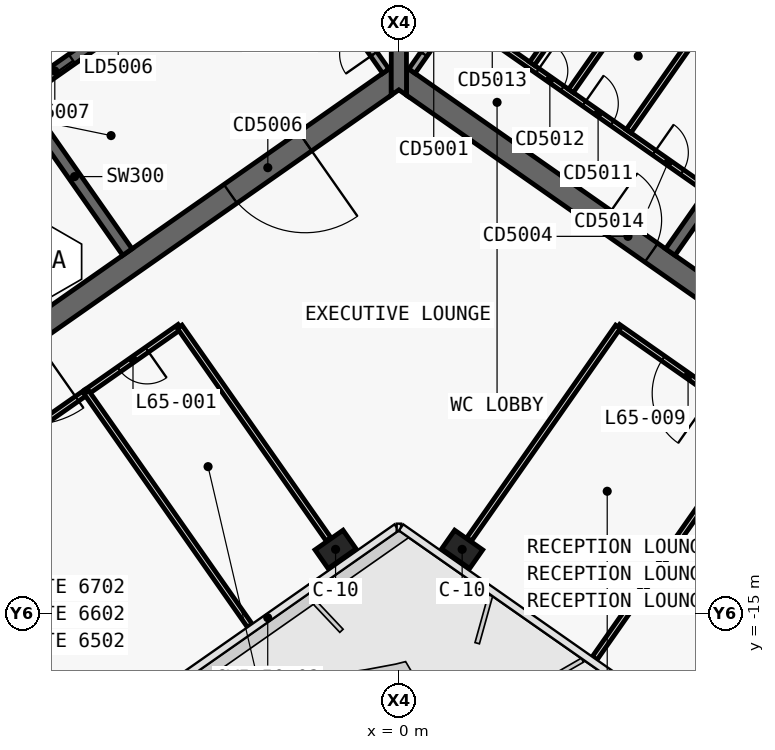
"""IFC4 building model, lengths in metres.
Left out: names, types, materials, properties, quantities, classifications, styles, units other than length and angle.
Written with IfcOpenShell. Run it as: python <this file> out.ifc"""

import sys

from ifc_helpers import new_model, si_unit, direction, frame, frame_2d, origin, origin_2d, place, context, subcontext, project, spatial, polyline, rectangle, outline, extrude, element, fill, save


model = new_model("IFC4")
c1 = context("Model", 3, precision=1e-05, world=origin(), true_north=direction((0.0, 1.0)))
c2 = subcontext(c1, "Body", "Model", "MODEL_VIEW")
j1 = project(units=[si_unit("LENGTHUNIT", "METRE"), si_unit("PLANEANGLEUNIT", "RADIAN")], contexts=[c1])
p1 = place(None, origin())
s1 = spatial("IfcSite", under=j1, at=p1, CompositionType="ELEMENT")
p2 = place(p1, origin())
s2 = spatial("IfcBuilding", under=s1, at=p2, CompositionType="ELEMENT")
p3 = place(p2, frame((0.0, 0.0, 276.1)))
s3 = spatial("IfcBuildingStorey", under=s2, at=p3, CompositionType="ELEMENT", Elevation=276.1)
p4 = place(p3, frame((-0.028, 12.066, 0.0), z_axis=(0.0, 0.0, 1.0), x_axis=(-0.819151382952, -0.573577380837, 0.0)))
e1 = element("IfcWall", 1, at=p4, inside=s3, PredefinedType="SHEAR", context=c2, shape_type="SweptSolid", body=[
    extrude(outline(polyline([(33.898, 0.3), (0.42, 0.3), (0.0, -0.3), (33.898, -0.3), (33.898, 0.3)])), origin(), (0.0, 0.0, 1.0), 3.9),
])
p5 = place(p3, frame((-0.028, -0.874, 0.0), z_axis=(0.0, 0.0, 1.0), x_axis=(-0.819150035022, -0.573579305871, 0.0)))
e2 = element("IfcWall", 2, at=p5, inside=s3, PredefinedType="SHEAR", context=c2, shape_type="SweptSolid", body=[
    extrude(outline(polyline([(26.476, 0.3), (0.42, 0.3), (0.0, -0.3), (26.476, -0.3), (26.476, 0.3)])), origin(), (0.0, 0.0, 1.0), 3.9),
])
p6 = place(p5, frame((2.976, 0.0, 0.0)))
e3 = element("IfcOpeningElement", 3, at=p6, cuts=e2, PredefinedType="OPENING", context=c2, shape_type="SweptSolid", body=[
    extrude(rectangle(XDim=2.4, YDim=2.1, at=frame_2d((1.2, 1.05))), frame((0.0, 0.31, 0.0), z_axis=(0.0, -1.0, 0.0), x_axis=(1.0, 0.0, 0.0)), (0.0, 0.0, 1.0), 0.62),
])
p7 = place(p5, frame((11.776, 0.0, 0.0)))
e4 = element("IfcOpeningElement", 4, at=p7, cuts=e2, PredefinedType="OPENING", context=c2, shape_type="SweptSolid", body=[
    extrude(rectangle(XDim=2.4, YDim=2.1, at=frame_2d((1.2, 1.05))), frame((0.0, 0.31, 0.0), z_axis=(0.0, -1.0, 0.0), x_axis=(1.0, 0.0, 0.0)), (0.0, 0.0, 1.0), 0.62),
])
p8 = place(p3, frame((-7.143, -5.49, 0.0), z_axis=(0.0, 0.0, 1.0), x_axis=(-0.573617744349, 0.819123118565, 0.0)))
e5 = element("IfcWall", 5, at=p8, inside=s3, PredefinedType="SHEAR", context=c2, shape_type="SweptSolid", body=[
    extrude(outline(polyline([(4.85, 0.15), (0.0, 0.15), (0.0, -0.15), (4.85, -0.15), (4.85, 0.15)])), origin(), (0.0, 0.0, 1.0), 3.9),
])
p9 = place(p3, frame((-2.638, 3.768, 0.0), z_axis=(0.0, 0.0, 1.0), x_axis=(-0.819155014212, -0.573572194837, 0.0)))
e6 = element("IfcWall", 6, at=p9, inside=s3, PredefinedType="SHEAR", context=c2, shape_type="SweptSolid", body=[
    extrude(outline(polyline([(26.4, 0.15), (0.0, 0.15), (0.0, -0.15), (26.4, -0.15), (26.4, 0.15)])), origin(), (0.0, 0.0, 1.0), 3.9),
])
p10 = place(p9, frame((1.169, 0.0, 0.0)))
e7 = element("IfcOpeningElement", 7, at=p10, cuts=e6, PredefinedType="OPENING", context=c2, shape_type="SweptSolid", body=[
    extrude(rectangle(XDim=1.1, YDim=2.1, at=frame_2d((0.55, 1.05))), frame((0.0, 0.16, 0.0), z_axis=(0.0, -1.0, 0.0), x_axis=(1.0, 0.0, 0.0)), (0.0, 0.0, 1.0), 0.32),
])
p11 = place(p9, frame((3.206, 0.0, 0.0)))
e8 = element("IfcOpeningElement", 8, at=p11, cuts=e6, PredefinedType="OPENING", context=c2, shape_type="SweptSolid", body=[
    extrude(rectangle(XDim=1.1, YDim=2.1, at=frame_2d((0.55, 1.05))), frame((0.0, 0.16, 0.0), z_axis=(0.0, -1.0, 0.0), x_axis=(1.0, 0.0, 0.0)), (0.0, 0.0, 1.0), 0.32),
])
p12 = place(p9, frame((5.244, 0.0, 0.0)))
e9 = element("IfcOpeningElement", 9, at=p12, cuts=e6, PredefinedType="OPENING", context=c2, shape_type="SweptSolid", body=[
    extrude(rectangle(XDim=1.1, YDim=2.1, at=frame_2d((0.55, 1.05))), frame((0.0, 0.16, 0.0), z_axis=(0.0, -1.0, 0.0), x_axis=(1.0, 0.0, 0.0)), (0.0, 0.0, 1.0), 0.32),
])
p13 = place(p9, frame((7.281, 0.0, 0.0)))
e10 = element("IfcOpeningElement", 10, at=p13, cuts=e6, PredefinedType="OPENING", context=c2, shape_type="SweptSolid", body=[
    extrude(rectangle(XDim=1.1, YDim=2.1, at=frame_2d((0.55, 1.05))), frame((0.0, 0.16, 0.0), z_axis=(0.0, -1.0, 0.0), x_axis=(1.0, 0.0, 0.0)), (0.0, 0.0, 1.0), 0.32),
])
p14 = place(p9, frame((9.688, 0.0, 0.0)))
e11 = element("IfcOpeningElement", 11, at=p14, cuts=e6, PredefinedType="OPENING", context=c2, shape_type="SweptSolid", body=[
    extrude(rectangle(XDim=1.1, YDim=2.1, at=frame_2d((0.55, 1.05))), frame((0.0, 0.16, 0.0), z_axis=(0.0, -1.0, 0.0), x_axis=(1.0, 0.0, 0.0)), (0.0, 0.0, 1.0), 0.32),
])
p15 = place(p9, frame((11.863, 0.0, 0.0)))
e12 = element("IfcOpeningElement", 12, at=p15, cuts=e6, PredefinedType="OPENING", context=c2, shape_type="SweptSolid", body=[
    extrude(rectangle(XDim=1.1, YDim=2.1, at=frame_2d((0.55, 1.05))), frame((0.0, 0.16, 0.0), z_axis=(0.0, -1.0, 0.0), x_axis=(1.0, 0.0, 0.0)), (0.0, 0.0, 1.0), 0.32),
])
p16 = place(p9, frame((14.552, 0.0, 0.0)))
e13 = element("IfcOpeningElement", 13, at=p16, cuts=e6, PredefinedType="OPENING", context=c2, shape_type="SweptSolid", body=[
    extrude(rectangle(XDim=1.0, YDim=2.1, at=frame_2d((0.5, 1.05))), frame((0.0, 0.16, 0.0), z_axis=(0.0, -1.0, 0.0), x_axis=(1.0, 0.0, 0.0)), (0.0, 0.0, 1.0), 0.32),
])
p17 = place(p9, frame((16.627, 0.0, 0.0)))
e14 = element("IfcOpeningElement", 14, at=p17, cuts=e6, PredefinedType="OPENING", context=c2, shape_type="SweptSolid", body=[
    extrude(rectangle(XDim=1.0, YDim=2.1, at=frame_2d((0.5, 1.05))), frame((0.0, 0.16, 0.0), z_axis=(0.0, -1.0, 0.0), x_axis=(1.0, 0.0, 0.0)), (0.0, 0.0, 1.0), 0.32),
])
p18 = place(p3, frame((0.028, 12.066, 0.0), z_axis=(0.0, 0.0, 1.0), x_axis=(0.819151382952, -0.573577380837, 0.0)))
e15 = element("IfcWall", 15, at=p18, inside=s3, PredefinedType="SHEAR", context=c2, shape_type="SweptSolid", body=[
    extrude(outline(polyline([(33.898, 0.3), (0.0, 0.3), (0.42, -0.3), (33.898, -0.3), (33.898, 0.3)])), origin(), (0.0, 0.0, 1.0), 3.9),
])
p19 = place(p3, frame((0.028, -0.874, 0.0), z_axis=(0.0, 0.0, 1.0), x_axis=(0.819150035022, -0.573579305871, 0.0)))
e16 = element("IfcWall", 16, at=p19, inside=s3, PredefinedType="SHEAR", context=c2, shape_type="SweptSolid", body=[
    extrude(outline(polyline([(26.476, 0.3), (0.0, 0.3), (0.42, -0.3), (26.476, -0.3), (26.476, 0.3)])), origin(), (0.0, 0.0, 1.0), 3.9),
])
p20 = place(p19, frame((6.576, 0.0, 0.0)))
e17 = element("IfcOpeningElement", 17, at=p20, cuts=e16, PredefinedType="OPENING", context=c2, shape_type="SweptSolid", body=[
    extrude(rectangle(XDim=1.5, YDim=2.1, at=frame_2d((0.75, 1.05))), frame((0.0, 0.31, 0.0), z_axis=(0.0, -1.0, 0.0), x_axis=(1.0, 0.0, 0.0)), (0.0, 0.0, 1.0), 0.62),
])
p21 = place(p19, frame((12.226, 0.0, 0.0)))
e18 = element("IfcOpeningElement", 18, at=p21, cuts=e16, PredefinedType="OPENING", context=c2, shape_type="SweptSolid", body=[
    extrude(rectangle(XDim=1.5, YDim=2.1, at=frame_2d((0.75, 1.05))), frame((0.0, 0.31, 0.0), z_axis=(0.0, -1.0, 0.0), x_axis=(1.0, 0.0, 0.0)), (0.0, 0.0, 1.0), 0.62),
])
p22 = place(p3, frame((7.143, -5.49, 0.0), z_axis=(0.0, 0.0, 1.0), x_axis=(0.573617744349, 0.819123118565, 0.0)))
e19 = element("IfcWall", 19, at=p22, inside=s3, PredefinedType="SHEAR", context=c2, shape_type="SweptSolid", body=[
    extrude(outline(polyline([(0.0, 0.15), (0.0, -0.15), (4.85, -0.15), (4.85, 0.15), (0.0, 0.15)])), origin(), (0.0, 0.0, 1.0), 3.9),
])
p23 = place(p3, frame((2.638, 3.768, 0.0), z_axis=(0.0, 0.0, 1.0), x_axis=(0.819155014212, -0.573572194837, 0.0)))
e20 = element("IfcWall", 20, at=p23, inside=s3, PredefinedType="SHEAR", context=c2, shape_type="SweptSolid", body=[
    extrude(outline(polyline([(0.0, 0.15), (0.0, -0.15), (26.4, -0.15), (26.4, 0.15), (0.0, 0.15)])), origin(), (0.0, 0.0, 1.0), 3.9),
])
p24 = place(p23, frame((9.637, 0.0, 0.0)))
e21 = element("IfcOpeningElement", 21, at=p24, cuts=e20, PredefinedType="OPENING", context=c2, shape_type="SweptSolid", body=[
    extrude(rectangle(XDim=1.2, YDim=2.1, at=frame_2d((0.6, 1.05))), frame((0.0, 0.16, 0.0), z_axis=(0.0, -1.0, 0.0), x_axis=(1.0, 0.0, 0.0)), (0.0, 0.0, 1.0), 0.32),
])
p25 = place(p23, frame((11.812, 0.0, 0.0)))
e22 = element("IfcOpeningElement", 22, at=p25, cuts=e20, PredefinedType="OPENING", context=c2, shape_type="SweptSolid", body=[
    extrude(rectangle(XDim=1.2, YDim=2.1, at=frame_2d((0.6, 1.05))), frame((0.0, 0.16, 0.0), z_axis=(0.0, -1.0, 0.0), x_axis=(1.0, 0.0, 0.0)), (0.0, 0.0, 1.0), 0.32),
])
p26 = place(p23, frame((13.988, 0.0, 0.0)))
e23 = element("IfcOpeningElement", 23, at=p26, cuts=e20, PredefinedType="OPENING", context=c2, shape_type="SweptSolid", body=[
    extrude(rectangle(XDim=1.2, YDim=2.1, at=frame_2d((0.6, 1.05))), frame((0.0, 0.16, 0.0), z_axis=(0.0, -1.0, 0.0), x_axis=(1.0, 0.0, 0.0)), (0.0, 0.0, 1.0), 0.32),
])
p27 = place(p23, frame((16.262, 0.0, 0.0)))
e24 = element("IfcOpeningElement", 24, at=p27, cuts=e20, PredefinedType="OPENING", context=c2, shape_type="SweptSolid", body=[
    extrude(rectangle(XDim=1.0, YDim=2.1, at=frame_2d((0.5, 1.05))), frame((0.0, 0.16, 0.0), z_axis=(0.0, -1.0, 0.0), x_axis=(1.0, 0.0, 0.0)), (0.0, 0.0, 1.0), 0.32),
])
p28 = place(p3, frame((0.0, -1.361, 0.0), z_axis=(0.0, 0.0, 1.0), x_axis=(0.0, 1.0, 0.0)))
e25 = element("IfcWall", 25, at=p28, inside=s3, PredefinedType="SHEAR", context=c2, shape_type="SweptSolid", body=[
    extrude(outline(polyline([(0.14, 0.2), (0.0, 0.2), (0.14, 0.0), (0.0, -0.2), (0.14, -0.2), (1.012, -0.2), (12.94, -0.2), (13.813, -0.2), (13.893, -0.2), (13.933, -0.172), (13.813, 0.0), (13.933, 0.172), (13.893, 0.2), (13.813, 0.2), (12.94, 0.2), (1.012, 0.2), (0.14, 0.2)])), origin(), (0.0, 0.0, 1.0), 3.9),
])
for number, where, z_axis, x_axis in (
    (26, (-1.665, -13.313, 0.0), (0.0, 0.0, 1.0), (-0.819, -0.574, 0.0)),
    (27, (1.665, -13.313, 0.0), (0.0, 0.0, 1.0), (0.819, -0.574, 0.0)),
):
    element("IfcColumn", number, at=place(p3, frame(where, z_axis=z_axis, x_axis=x_axis)), inside=s3, PredefinedType="COLUMN", context=c2, shape_type="SweptSolid", body=[
        extrude(rectangle(XDim=0.9, YDim=0.6, at=origin_2d()), origin(), (0.0, 0.0, 1.0), 3.9),
    ])
p29 = place(p3, frame((1.516, 0.77, 0.0), z_axis=(0.0, 0.0, 1.0), x_axis=(0.819146424436, -0.573584462249, 0.0)))
e28 = element("IfcWall", 28, at=p29, inside=s3, PredefinedType="PARTITIONING", context=c2, shape_type="SweptSolid", body=[
    extrude(rectangle(XDim=8.05, YDim=0.15, at=frame_2d((4.025, 0.0))), origin(), (0.0, 0.0, 1.0), 3.62),
])
p30 = place(p29, frame((0.7, 0.0, 0.0)))
e29 = element("IfcOpeningElement", 29, at=p30, cuts=e28, PredefinedType="OPENING", context=c2, shape_type="SweptSolid", body=[
    extrude(rectangle(XDim=0.9, YDim=2.1, at=frame_2d((0.45, 1.05))), frame((0.0, 0.085, 0.0), z_axis=(0.0, -1.0, 0.0), x_axis=(1.0, 0.0, 0.0)), (0.0, 0.0, 1.0), 0.17),
])
p31 = place(p29, frame((2.6, 0.0, 0.0)))
e30 = element("IfcOpeningElement", 30, at=p31, cuts=e28, PredefinedType="OPENING", context=c2, shape_type="SweptSolid", body=[
    extrude(rectangle(XDim=0.8, YDim=2.1, at=frame_2d((0.4, 1.05))), frame((0.0, 0.085, 0.0), z_axis=(0.0, -1.0, 0.0), x_axis=(1.0, 0.0, 0.0)), (0.0, 0.0, 1.0), 0.17),
])
p32 = place(p29, frame((4.1, 0.0, 0.0)))
e31 = element("IfcOpeningElement", 31, at=p32, cuts=e28, PredefinedType="OPENING", context=c2, shape_type="SweptSolid", body=[
    extrude(rectangle(XDim=0.9, YDim=2.1, at=frame_2d((0.45, 1.05))), frame((0.0, 0.085, 0.0), z_axis=(0.0, -1.0, 0.0), x_axis=(1.0, 0.0, 0.0)), (0.0, 0.0, 1.0), 0.17),
])
p33 = place(p29, frame((6.35, 0.0, 0.0)))
e32 = element("IfcOpeningElement", 32, at=p33, cuts=e28, PredefinedType="OPENING", context=c2, shape_type="SweptSolid", body=[
    extrude(rectangle(XDim=0.9, YDim=2.1, at=frame_2d((0.45, 1.05))), frame((0.0, 0.085, 0.0), z_axis=(0.0, -1.0, 0.0), x_axis=(1.0, 0.0, 0.0)), (0.0, 0.0, 1.0), 0.17),
])
p34 = place(p3, frame((3.504, -0.531, 0.0), z_axis=(0.0, 0.0, 1.0), x_axis=(0.573582013179, 0.819148139324, 0.0)))
e33 = element("IfcWall", 33, at=p34, inside=s3, PredefinedType="PARTITIONING", context=c2, shape_type="SweptSolid", body=[
    extrude(rectangle(XDim=2.875, YDim=0.15, at=frame_2d((1.438, 0.0))), origin(), (0.0, 0.0, 1.0), 3.62),
])
p35 = place(p3, frame((4.528, -1.248, 0.0), z_axis=(0.0, 0.0, 1.0), x_axis=(0.573621911162, 0.819120200602, 0.0)))
e34 = element("IfcWall", 34, at=p35, inside=s3, PredefinedType="PARTITIONING", context=c2, shape_type="SweptSolid", body=[
    extrude(rectangle(XDim=2.875, YDim=0.15, at=frame_2d((1.438, 0.0))), origin(), (0.0, 0.0, 1.0), 3.62),
])
p36 = place(p3, frame((6.044, -2.309, 0.0), z_axis=(0.0, 0.0, 1.0), x_axis=(0.573564930514, 0.819160100642, 0.0)))
e35 = element("IfcWall", 35, at=p36, inside=s3, PredefinedType="PARTITIONING", context=c2, shape_type="SweptSolid", body=[
    extrude(rectangle(XDim=2.875, YDim=0.15, at=frame_2d((1.438, 0.0))), origin(), (0.0, 0.0, 1.0), 3.62),
])
p37 = place(p3, frame((-0.344, -0.729, 0.0), z_axis=(0.0, 0.0, 1.0), x_axis=(-0.573560315113, 0.819163332265, 0.0)))
e36 = element("IfcWall", 36, at=p37, inside=s3, PredefinedType="SOLIDWALL", context=c2, shape_type="SweptSolid", body=[
    extrude(rectangle(XDim=4.85, YDim=0.2, at=frame_2d((2.425, 0.0))), origin(), (0.0, 0.0, 1.0), 3.62),
])
p38 = place(p37, frame((0.55, 0.0, 0.0)))
e37 = element("IfcOpeningElement", 37, at=p38, cuts=e36, PredefinedType="OPENING", context=c2, shape_type="SweptSolid", body=[
    extrude(rectangle(XDim=0.9, YDim=2.1, at=frame_2d((0.45, 1.05))), frame((0.0, 0.11, 0.0), z_axis=(0.0, -1.0, 0.0), x_axis=(1.0, 0.0, 0.0)), (0.0, 0.0, 1.0), 0.22),
])
p39 = place(p3, frame((0.344, -0.729, 0.0), z_axis=(0.0, 0.0, 1.0), x_axis=(0.573560315113, 0.819163332265, 0.0)))
e38 = element("IfcWall", 38, at=p39, inside=s3, PredefinedType="SOLIDWALL", context=c2, shape_type="SweptSolid", body=[
    extrude(rectangle(XDim=4.85, YDim=0.2, at=frame_2d((2.425, 0.0))), origin(), (0.0, 0.0, 1.0), 3.62),
])
p40 = place(p39, frame((0.55, 0.0, 0.0)))
e39 = element("IfcOpeningElement", 39, at=p40, cuts=e38, PredefinedType="OPENING", context=c2, shape_type="SweptSolid", body=[
    extrude(rectangle(XDim=0.9, YDim=2.1, at=frame_2d((0.45, 1.05))), frame((0.0, 0.11, 0.0), z_axis=(0.0, -1.0, 0.0), x_axis=(1.0, 0.0, 0.0)), (0.0, 0.0, 1.0), 0.22),
])
p41 = place(p3, frame((9.454, -10.038, 0.0), z_axis=(0.0, 0.0, 1.0), x_axis=(-0.819142740634, 0.573589723117, 0.0)))
e40 = element("IfcWall", 40, at=p41, inside=s3, PredefinedType="PARTITIONING", context=c2, shape_type="SweptSolid", body=[
    extrude(rectangle(XDim=4.502, YDim=0.15, at=frame_2d((2.251, 0.0))), origin(), (0.0, 0.0, 1.0), 3.05),
])
p42 = place(p41, frame((1.451, 0.0, 0.0)))
e41 = element("IfcOpeningElement", 41, at=p42, cuts=e40, PredefinedType="OPENING", context=c2, shape_type="SweptSolid", body=[
    extrude(rectangle(XDim=1.6, YDim=2.1, at=frame_2d((0.8, 1.05))), frame((0.0, 0.085, 0.0), z_axis=(0.0, -1.0, 0.0), x_axis=(1.0, 0.0, 0.0)), (0.0, 0.0, 1.0), 0.17),
])
p43 = place(p3, frame((-5.766, -7.456, 0.0), z_axis=(0.0, 0.0, 1.0), x_axis=(-0.819132568355, -0.573604249862, 0.0)))
e42 = element("IfcWall", 42, at=p43, inside=s3, PredefinedType="PARTITIONING", context=c2, shape_type="SweptSolid", body=[
    extrude(rectangle(XDim=3.002, YDim=0.15, at=frame_2d((1.501, 0.0))), origin(), (0.0, 0.0, 1.0), 3.05),
])
p44 = place(p43, frame((1.051, 0.0, 0.0)))
e43 = element("IfcOpeningElement", 43, at=p44, cuts=e42, PredefinedType="OPENING", context=c2, shape_type="SweptSolid", body=[
    extrude(rectangle(XDim=0.9, YDim=2.1, at=frame_2d((0.45, 1.05))), frame((0.0, 0.085, 0.0), z_axis=(0.0, -1.0, 0.0), x_axis=(1.0, 0.0, 0.0)), (0.0, 0.0, 1.0), 0.17),
])
p45 = place(p3, frame((-8.222, -9.175, 0.0), z_axis=(0.0, 0.0, 1.0), x_axis=(-0.819151661297, -0.57357698332, 0.0)))
e44 = element("IfcWall", 44, at=p45, inside=s3, PredefinedType="PARTITIONING", context=c2, shape_type="SweptSolid", body=[
    extrude(rectangle(XDim=9.004, YDim=0.15, at=frame_2d((4.502, 0.0))), origin(), (0.0, 0.0, 1.0), 3.05),
])
p46 = place(p45, frame((3.702, 0.0, 0.0)))
e45 = element("IfcOpeningElement", 45, at=p46, cuts=e44, PredefinedType="OPENING", context=c2, shape_type="SweptSolid", body=[
    extrude(rectangle(XDim=1.6, YDim=2.1, at=frame_2d((0.8, 1.05))), frame((0.0, 0.085, 0.0), z_axis=(0.0, -1.0, 0.0), x_axis=(1.0, 0.0, 0.0)), (0.0, 0.0, 1.0), 0.17),
])
p47 = place(p3, frame((9.452, -10.037, 0.0), z_axis=(0.0, 0.0, 1.0), x_axis=(-0.573575945067, -0.81915238829, 0.0)))
e46 = element("IfcWall", 46, at=p47, inside=s3, PredefinedType="PARTITIONING", context=c2, shape_type="SweptSolid", body=[
    extrude(rectangle(XDim=7.5, YDim=0.15, at=frame_2d((3.75, 0.0))), origin(), (0.0, 0.0, 1.0), 3.0),
])
p48 = place(p3, frame((1.849, -13.051, 0.0), z_axis=(0.0, 0.0, 1.0), x_axis=(0.573577493031, 0.819151304393, 0.0)))
e47 = element("IfcWall", 47, at=p48, inside=s3, PredefinedType="PARTITIONING", context=c2, shape_type="SweptSolid", body=[
    extrude(rectangle(XDim=6.83, YDim=0.15, at=frame_2d((3.415, 0.0))), origin(), (0.0, 0.0, 1.0), 3.05),
])
p49 = place(p3, frame((11.91, -11.758, 0.0), z_axis=(0.0, 0.0, 1.0), x_axis=(-0.573560650686, -0.819163097304, 0.0)))
e48 = element("IfcWall", 48, at=p49, inside=s3, PredefinedType="PARTITIONING", context=c2, shape_type="SweptSolid", body=[
    extrude(rectangle(XDim=7.5, YDim=0.15, at=frame_2d((3.75, 0.0))), origin(), (0.0, 0.0, 1.0), 3.0),
])
p50 = place(p3, frame((-1.849, -13.051, 0.0), z_axis=(0.0, 0.0, 1.0), x_axis=(-0.57357985571, 0.819149650018, 0.0)))
e49 = element("IfcWall", 49, at=p50, inside=s3, PredefinedType="PARTITIONING", context=c2, shape_type="SweptSolid", body=[
    extrude(rectangle(XDim=6.832, YDim=0.15, at=frame_2d((3.416, 0.0))), origin(), (0.0, 0.0, 1.0), 3.05),
])
p51 = place(p3, frame((-3.922, -15.32, 0.0), z_axis=(0.0, 0.0, 1.0), x_axis=(-0.573560650686, 0.819163097304, 0.0)))
e50 = element("IfcWall", 50, at=p51, inside=s3, PredefinedType="PARTITIONING", context=c2, shape_type="SweptSolid", body=[
    extrude(rectangle(XDim=7.5, YDim=0.15, at=frame_2d((3.75, 0.0))), origin(), (0.0, 0.0, 1.0), 3.0),
])
p52 = place(p13, origin())
e51 = element("IfcDoor", 51, at=p52, inside=s3, OperationType="SLIDING_TO_RIGHT", PredefinedType="DOOR", context=c2, shape_type="SweptSolid", body=[
    extrude(rectangle(XDim=1.1, YDim=2.1, at=frame_2d((0.55, 1.05))), frame((0.0, 0.025, 0.0), z_axis=(0.0, -1.0, 0.0), x_axis=(1.0, 0.0, 0.0)), (0.0, 0.0, 1.0), 0.05),
])
fill(e10, e51)
p53 = place(p6, origin())
e52 = element("IfcDoor", 52, at=p53, inside=s3, OperationType="DOUBLE_DOOR_SINGLE_SWING", PredefinedType="DOOR", context=c2, shape_type="SweptSolid", body=[
    extrude(rectangle(XDim=2.4, YDim=2.1, at=frame_2d((1.2, 1.05))), frame((0.0, 0.025, 0.0), z_axis=(0.0, -1.0, 0.0), x_axis=(1.0, 0.0, 0.0)), (0.0, 0.0, 1.0), 0.05),
])
fill(e3, e52)
p54 = place(p31, origin())
e53 = element("IfcDoor", 53, at=p54, inside=s3, OperationType="SINGLE_SWING_RIGHT", PredefinedType="DOOR", context=c2, shape_type="SweptSolid", body=[
    extrude(rectangle(XDim=0.8, YDim=2.1, at=frame_2d((0.4, 1.05))), frame((0.0, 0.025, 0.0), z_axis=(0.0, -1.0, 0.0), x_axis=(1.0, 0.0, 0.0)), (0.0, 0.0, 1.0), 0.05),
])
fill(e30, e53)
p55 = place(p32, origin())
e54 = element("IfcDoor", 54, at=p55, inside=s3, OperationType="SINGLE_SWING_RIGHT", PredefinedType="DOOR", context=c2, shape_type="SweptSolid", body=[
    extrude(rectangle(XDim=0.9, YDim=2.1, at=frame_2d((0.45, 1.05))), frame((0.0, 0.025, 0.0), z_axis=(0.0, -1.0, 0.0), x_axis=(1.0, 0.0, 0.0)), (0.0, 0.0, 1.0), 0.05),
])
fill(e31, e54)
p56 = place(p33, origin())
e55 = element("IfcDoor", 55, at=p56, inside=s3, OperationType="SINGLE_SWING_RIGHT", PredefinedType="DOOR", context=c2, shape_type="SweptSolid", body=[
    extrude(rectangle(XDim=0.9, YDim=2.1, at=frame_2d((0.45, 1.05))), frame((0.0, 0.025, 0.0), z_axis=(0.0, -1.0, 0.0), x_axis=(1.0, 0.0, 0.0)), (0.0, 0.0, 1.0), 0.05),
])
fill(e32, e55)
p57 = place(p20, origin())
e56 = element("IfcDoor", 56, at=p57, inside=s3, OperationType="SINGLE_SWING_RIGHT", PredefinedType="DOOR", context=c2, shape_type="SweptSolid", body=[
    extrude(rectangle(XDim=1.5, YDim=2.1, at=frame_2d((0.75, 1.05))), frame((0.0, 0.025, 0.0), z_axis=(0.0, -1.0, 0.0), x_axis=(1.0, 0.0, 0.0)), (0.0, 0.0, 1.0), 0.05),
])
fill(e17, e56)
p58 = place(p38, origin())
e57 = element("IfcDoor", 57, at=p58, inside=s3, OperationType="SINGLE_SWING_RIGHT", PredefinedType="DOOR", context=c2, shape_type="SweptSolid", body=[
    extrude(rectangle(XDim=0.9, YDim=2.1, at=frame_2d((0.45, 1.05))), frame((0.0, 0.025, 0.0), z_axis=(0.0, -1.0, 0.0), x_axis=(1.0, 0.0, 0.0)), (0.0, 0.0, 1.0), 0.05),
])
fill(e37, e57)
p59 = place(p40, origin())
e58 = element("IfcDoor", 58, at=p59, inside=s3, OperationType="SINGLE_SWING_RIGHT", PredefinedType="DOOR", context=c2, shape_type="SweptSolid", body=[
    extrude(rectangle(XDim=0.9, YDim=2.1, at=frame_2d((0.45, 1.05))), frame((0.0, 0.025, 0.0), z_axis=(0.0, -1.0, 0.0), x_axis=(1.0, 0.0, 0.0)), (0.0, 0.0, 1.0), 0.05),
])
fill(e39, e58)
p60 = place(p44, origin())
e59 = element("IfcDoor", 59, at=p60, inside=s3, OperationType="SINGLE_SWING_RIGHT", PredefinedType="DOOR", context=c2, shape_type="SweptSolid", body=[
    extrude(rectangle(XDim=0.9, YDim=2.1, at=frame_2d((0.45, 1.05))), frame((0.0, 0.025, 0.0), z_axis=(0.0, -1.0, 0.0), x_axis=(1.0, 0.0, 0.0)), (0.0, 0.0, 1.0), 0.05),
])
fill(e43, e59)
p61 = place(p42, origin())
e60 = element("IfcDoor", 60, at=p61, inside=s3, OperationType="DOUBLE_DOOR_SINGLE_SWING", PredefinedType="DOOR", context=c2, shape_type="SweptSolid", body=[
    extrude(rectangle(XDim=1.6, YDim=2.1, at=frame_2d((0.8, 1.05))), frame((0.0, 0.025, 0.0), z_axis=(0.0, -1.0, 0.0), x_axis=(1.0, 0.0, 0.0)), (0.0, 0.0, 1.0), 0.05),
])
fill(e41, e60)
save(model, sys.argv[1])
